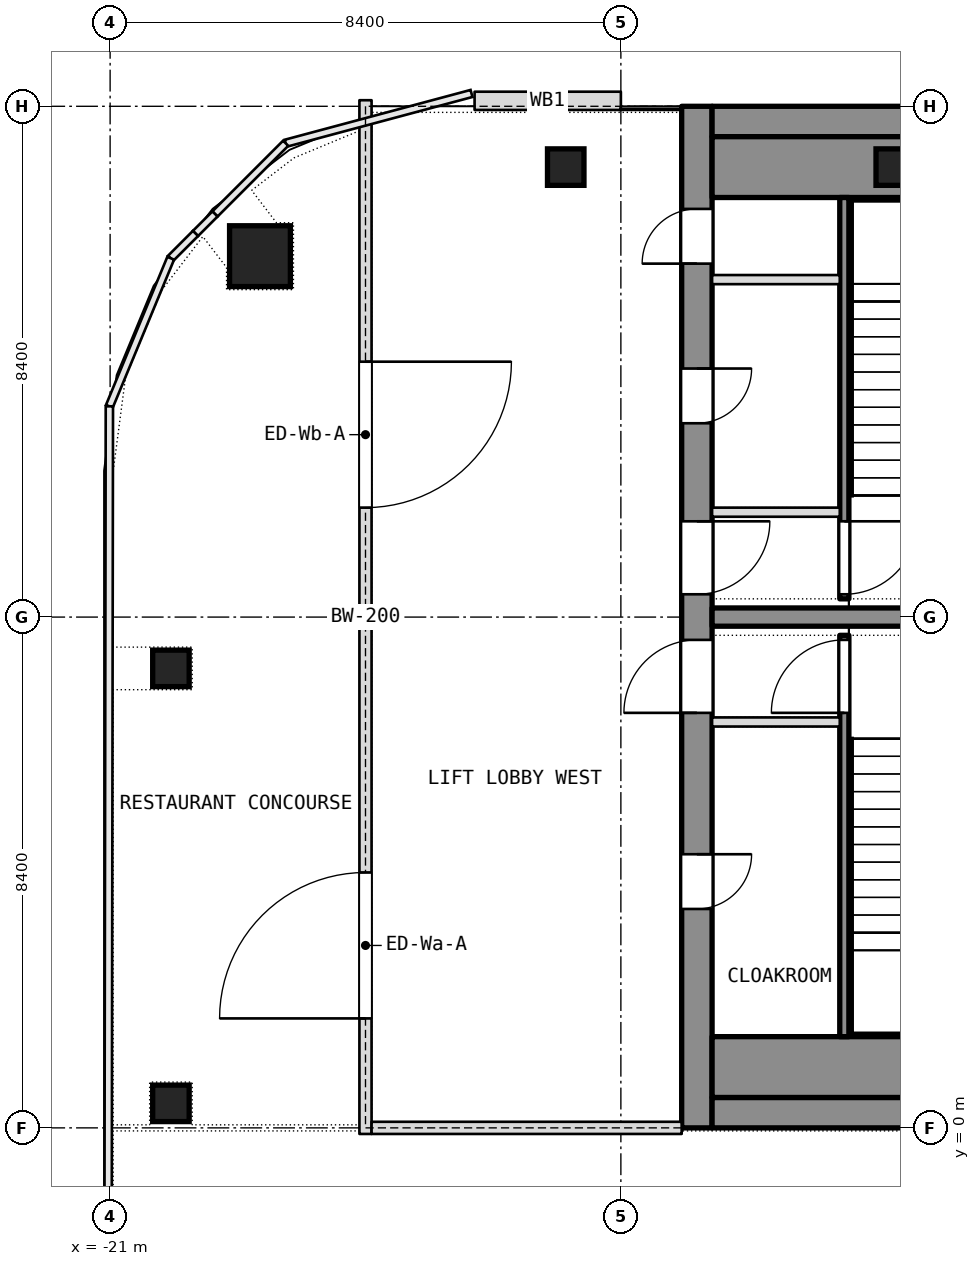
"""IFC4 building model, lengths in metres.
Left out: names, types, materials, properties, quantities, classifications, styles, units other than length and angle.
Written with IfcOpenShell. Run it as: python <this file> out.ifc"""

import sys

from ifc_helpers import new_model, si_unit, direction, frame, frame_2d, origin, origin_2d, place, context, subcontext, project, spatial, rectangle, extrude, element, fill, save


model = new_model("IFC4")
c1 = context("Model", 3, precision=1e-05, world=origin(), true_north=direction((0.0, 1.0)))
c2 = subcontext(c1, "Body", "Model", "MODEL_VIEW")
j1 = project(units=[si_unit("LENGTHUNIT", "METRE"), si_unit("PLANEANGLEUNIT", "RADIAN")], contexts=[c1])
p1 = place(None, origin())
s1 = spatial("IfcSite", under=j1, at=p1, CompositionType="ELEMENT")
p2 = place(p1, origin())
s2 = spatial("IfcBuilding", under=s1, at=p2, CompositionType="ELEMENT")
p3 = place(p2, frame((0.0, 0.0, 288.5)))
s3 = spatial("IfcBuildingStorey", under=s2, at=p3, CompositionType="ELEMENT", Elevation=288.5)
p4 = place(p3, frame((-11.35, 0.0, 0.0), z_axis=(0.0, 0.0, 1.0), x_axis=(0.0, 1.0, 0.0)))
e1 = element("IfcWall", 1, at=p4, inside=s3, PredefinedType="SHEAR", context=c2, shape_type="SweptSolid", body=[
    extrude(rectangle(XDim=16.8, YDim=0.5, at=frame_2d((8.4, 0.0))), origin(), (0.0, 0.0, 1.0), 7.2),
])
p5 = place(p4, frame((3.6, 0.0, 0.0)))
e2 = element("IfcOpeningElement", 2, at=p5, cuts=e1, PredefinedType="OPENING", context=c2, shape_type="SweptSolid", body=[
    extrude(rectangle(XDim=0.9, YDim=2.1, at=frame_2d((0.45, 1.05))), frame((0.0, 0.25, 0.0), z_axis=(0.0, -1.0, 0.0), x_axis=(1.0, 0.0, 0.0)), (0.0, 0.0, 1.0), 0.5),
])
p6 = place(p4, frame((6.825, 0.0, 0.0)))
e3 = element("IfcOpeningElement", 3, at=p6, cuts=e1, PredefinedType="OPENING", context=c2, shape_type="SweptSolid", body=[
    extrude(rectangle(XDim=1.2, YDim=2.1, at=frame_2d((0.6, 1.05))), frame((0.0, 0.25, 0.0), z_axis=(0.0, -1.0, 0.0), x_axis=(1.0, 0.0, 0.0)), (0.0, 0.0, 1.0), 0.5),
])
p7 = place(p4, frame((14.212, 0.0, 0.0)))
e4 = element("IfcOpeningElement", 4, at=p7, cuts=e1, PredefinedType="OPENING", context=c2, shape_type="SweptSolid", body=[
    extrude(rectangle(XDim=0.9, YDim=2.1, at=frame_2d((0.45, 1.05))), frame((0.0, 0.25, 0.0), z_axis=(0.0, -1.0, 0.0), x_axis=(1.0, 0.0, 0.0)), (0.0, 0.0, 1.0), 0.5),
])
p8 = place(p4, frame((11.587, 0.0, 0.0)))
e5 = element("IfcOpeningElement", 5, at=p8, cuts=e1, PredefinedType="OPENING", context=c2, shape_type="SweptSolid", body=[
    extrude(rectangle(XDim=0.9, YDim=2.1, at=frame_2d((0.45, 1.05))), frame((0.0, 0.25, 0.0), z_axis=(0.0, -1.0, 0.0), x_axis=(1.0, 0.0, 0.0)), (0.0, 0.0, 1.0), 0.5),
])
p9 = place(p4, frame((8.775, 0.0, 0.0)))
e6 = element("IfcOpeningElement", 6, at=p9, cuts=e1, PredefinedType="OPENING", context=c2, shape_type="SweptSolid", body=[
    extrude(rectangle(XDim=1.2, YDim=2.1, at=frame_2d((0.6, 1.05))), frame((0.0, 0.25, 0.0), z_axis=(0.0, -1.0, 0.0), x_axis=(1.0, 0.0, 0.0)), (0.0, 0.0, 1.0), 0.5),
])
for number, where, z_axis, x_axis in (
    (7, (-11.1, 0.25, 0.0), (0.0, 0.0, 1.0), (1.0, 0.0, 0.0)),
    (8, (-11.1, 16.55, 0.0), (0.0, 0.0, 1.0), (1.0, 0.0, 0.0)),
):
    element("IfcWall", number, at=place(p3, frame(where, z_axis=z_axis, x_axis=x_axis)), inside=s3, PredefinedType="SHEAR", context=c2, shape_type="SweptSolid", body=[
        extrude(rectangle(XDim=22.2, YDim=0.5, at=frame_2d((11.1, 0.0))), origin(), (0.0, 0.0, 1.0), 7.2),
    ])
p10 = place(p3, frame((-11.1, 8.4, 0.0), z_axis=(0.0, 0.0, 1.0), x_axis=(1.0, 0.0, 0.0)))
e9 = element("IfcWall", 9, at=p10, inside=s3, PredefinedType="SHEAR", context=c2, shape_type="SweptSolid", body=[
    extrude(rectangle(XDim=6.75, YDim=0.3, at=frame_2d((3.375, 0.0))), origin(), (0.0, 0.0, 1.0), 7.2),
])
p11 = place(p3, frame((-18.535, 14.335, 0.0), z_axis=(0.0, 0.0, 1.0), x_axis=(1.0, 0.0, 0.0)))
e10 = element("IfcColumn", 10, at=p11, inside=s3, PredefinedType="COLUMN", context=c2, shape_type="SweptSolid", body=[
    extrude(rectangle(XDim=1.0, YDim=1.0, at=origin_2d()), origin(), (0.0, 0.0, 1.0), 6.9),
])
for number, where, z_axis, x_axis in (
    (11, (-20.0, 0.403, 0.0), (0.0, 0.0, 1.0), (1.0, 0.0, 0.0)),
    (12, (-20.0, 7.556, 0.0), (0.0, 0.0, 1.0), (1.0, 0.0, 0.0)),
    (13, (-13.507, 15.8, 0.0), (0.0, 0.0, 1.0), (1.0, 0.0, 0.0)),
    (14, (-8.104, 15.8, 0.0), (0.0, 0.0, 1.0), (1.0, 0.0, 0.0)),
):
    element("IfcColumn", number, at=place(p3, frame(where, z_axis=z_axis, x_axis=x_axis)), inside=s3, PredefinedType="COLUMN", context=c2, shape_type="SweptSolid", body=[
        extrude(rectangle(XDim=0.6, YDim=0.6, at=origin_2d()), origin(), (0.0, 0.0, 1.0), 6.9),
    ])
p12 = place(p3, frame((-12.6, 16.89, 0.0), z_axis=(0.0, 0.0, 1.0), x_axis=(-1.0, 0.0, 0.0)))
e15 = element("IfcWall", 15, at=p12, inside=s3, PredefinedType="NOTDEFINED", context=c2, shape_type="SweptSolid", body=[
    extrude(rectangle(XDim=2.406, YDim=0.3, at=frame_2d((1.203, 0.0))), origin(), (0.0, 0.0, 1.0), 7.2),
])
for number, where, z_axis, x_axis in (
    (16, (-11.1, 1.0, 0.0), (0.0, 0.0, 1.0), (1.0, 0.0, 0.0)),
    (17, (-11.1, 15.8, 0.0), (0.0, 0.0, 1.0), (1.0, 0.0, 0.0)),
):
    element("IfcWall", number, at=place(p3, frame(where, z_axis=z_axis, x_axis=x_axis)), inside=s3, PredefinedType="PARTITIONING", context=c2, shape_type="SweptSolid", body=[
        extrude(rectangle(XDim=22.2, YDim=1.0, at=frame_2d((11.1, 0.0))), origin(), (0.0, 0.0, 1.0), 6.9),
    ])
p13 = place(p3, frame((-8.925, 1.5, 0.0), z_axis=(0.0, 0.0, 1.0), x_axis=(0.0, 1.0, 0.0)))
e18 = element("IfcWall", 18, at=p13, inside=s3, PredefinedType="SHEAR", context=c2, shape_type="SweptSolid", body=[
    extrude(rectangle(XDim=6.6, YDim=0.15, at=frame_2d((3.3, 0.0))), origin(), (0.0, 0.0, 1.0), 6.9),
])
p14 = place(p13, frame((5.325, 0.0, 0.0)))
e19 = element("IfcOpeningElement", 19, at=p14, cuts=e18, PredefinedType="OPENING", context=c2, shape_type="SweptSolid", body=[
    extrude(rectangle(XDim=1.2, YDim=2.1, at=frame_2d((0.6, 1.05))), frame((0.0, 0.075, 0.0), z_axis=(0.0, -1.0, 0.0), x_axis=(1.0, 0.0, 0.0)), (0.0, 0.0, 1.0), 0.15),
])
p15 = place(p3, frame((-11.1, 6.675, 0.0), z_axis=(0.0, 0.0, 1.0), x_axis=(1.0, 0.0, 0.0)))
e20 = element("IfcWall", 20, at=p15, inside=s3, PredefinedType="PARTITIONING", context=c2, shape_type="SweptSolid", body=[
    extrude(rectangle(XDim=2.1, YDim=0.15, at=frame_2d((1.05, 0.0))), origin(), (0.0, 0.0, 1.0), 6.9),
])
p16 = place(p3, frame((-8.925, 8.7, 0.0), z_axis=(0.0, 0.0, 1.0), x_axis=(0.0, 1.0, 0.0)))
e21 = element("IfcWall", 21, at=p16, inside=s3, PredefinedType="SHEAR", context=c2, shape_type="SweptSolid", body=[
    extrude(rectangle(XDim=6.6, YDim=0.15, at=frame_2d((3.3, 0.0))), origin(), (0.0, 0.0, 1.0), 6.9),
])
p17 = place(p16, frame((0.075, 0.0, 0.0)))
e22 = element("IfcOpeningElement", 22, at=p17, cuts=e21, PredefinedType="OPENING", context=c2, shape_type="SweptSolid", body=[
    extrude(rectangle(XDim=1.2, YDim=2.1, at=frame_2d((0.6, 1.05))), frame((0.0, 0.075, 0.0), z_axis=(0.0, -1.0, 0.0), x_axis=(1.0, 0.0, 0.0)), (0.0, 0.0, 1.0), 0.15),
])
for number, where, z_axis, x_axis in (
    (23, (-11.1, 10.125, 0.0), (0.0, 0.0, 1.0), (1.0, 0.0, 0.0)),
    (24, (-11.1, 13.95, 0.0), (0.0, 0.0, 1.0), (1.0, 0.0, 0.0)),
):
    element("IfcWall", number, at=place(p3, frame(where, z_axis=z_axis, x_axis=x_axis)), inside=s3, PredefinedType="PARTITIONING", context=c2, shape_type="SweptSolid", body=[
        extrude(rectangle(XDim=2.1, YDim=0.15, at=frame_2d((1.05, 0.0))), origin(), (0.0, 0.0, 1.0), 6.9),
    ])
p18 = place(p3, frame((-16.8, -0.1, 0.0), z_axis=(0.0, 0.0, 1.0), x_axis=(0.0, 1.0, 0.0)))
e25 = element("IfcWall", 25, at=p18, inside=s3, PredefinedType="PARTITIONING", context=c2, shape_type="SweptSolid", body=[
    extrude(rectangle(XDim=17.0, YDim=0.2, at=frame_2d((8.5, 0.0))), origin(), (0.0, 0.0, 1.0), 6.9),
])
p19 = place(p18, frame((1.9, 0.0, 0.0)))
e26 = element("IfcOpeningElement", 26, at=p19, cuts=e25, PredefinedType="OPENING", context=c2, shape_type="SweptSolid", body=[
    extrude(rectangle(XDim=2.4, YDim=2.1, at=frame_2d((1.2, 1.05))), frame((0.0, 0.1, 0.0), z_axis=(0.0, -1.0, 0.0), x_axis=(1.0, 0.0, 0.0)), (0.0, 0.0, 1.0), 0.2),
])
p20 = place(p18, frame((10.3, 0.0, 0.0)))
e27 = element("IfcOpeningElement", 27, at=p20, cuts=e25, PredefinedType="OPENING", context=c2, shape_type="SweptSolid", body=[
    extrude(rectangle(XDim=2.4, YDim=2.1, at=frame_2d((1.2, 1.05))), frame((0.0, 0.1, 0.0), z_axis=(0.0, -1.0, 0.0), x_axis=(1.0, 0.0, 0.0)), (0.0, 0.0, 1.0), 0.2),
])
p21 = place(p3, frame((-16.7, 0.0, 0.0), z_axis=(0.0, 0.0, 1.0), x_axis=(1.0, 0.0, 0.0)))
e28 = element("IfcWall", 28, at=p21, inside=s3, PredefinedType="PARTITIONING", context=c2, shape_type="SweptSolid", body=[
    extrude(rectangle(XDim=5.1, YDim=0.2, at=frame_2d((2.55, 0.0))), origin(), (0.0, 0.0, 1.0), 6.56),
])
p22 = place(p5, origin())
e29 = element("IfcDoor", 29, at=p22, inside=s3, OperationType="SINGLE_SWING_LEFT", PredefinedType="DOOR", context=c2, shape_type="SweptSolid", body=[
    extrude(rectangle(XDim=0.9, YDim=2.1, at=frame_2d((0.45, 1.05))), frame((0.0, 0.025, 0.0), z_axis=(0.0, -1.0, 0.0), x_axis=(1.0, 0.0, 0.0)), (0.0, 0.0, 1.0), 0.05),
])
fill(e2, e29)
p23 = place(p6, origin())
e30 = element("IfcDoor", 30, at=p23, inside=s3, OperationType="SINGLE_SWING_LEFT", PredefinedType="DOOR", context=c2, shape_type="SweptSolid", body=[
    extrude(rectangle(XDim=1.2, YDim=2.1, at=frame_2d((0.6, 1.05))), frame((0.0, 0.025, 0.0), z_axis=(0.0, -1.0, 0.0), x_axis=(1.0, 0.0, 0.0)), (0.0, 0.0, 1.0), 0.05),
])
fill(e3, e30)
p24 = place(p14, origin())
e31 = element("IfcDoor", 31, at=p24, inside=s3, OperationType="SINGLE_SWING_LEFT", PredefinedType="DOOR", context=c2, shape_type="SweptSolid", body=[
    extrude(rectangle(XDim=1.2, YDim=2.1, at=frame_2d((0.6, 1.05))), frame((0.0, 0.025, 0.0), z_axis=(0.0, -1.0, 0.0), x_axis=(1.0, 0.0, 0.0)), (0.0, 0.0, 1.0), 0.05),
])
fill(e19, e31)
p25 = place(p7, origin())
e32 = element("IfcDoor", 32, at=p25, inside=s3, OperationType="SINGLE_SWING_LEFT", PredefinedType="DOOR", context=c2, shape_type="SweptSolid", body=[
    extrude(rectangle(XDim=0.9, YDim=2.1, at=frame_2d((0.45, 1.05))), frame((0.0, 0.025, 0.0), z_axis=(0.0, -1.0, 0.0), x_axis=(1.0, 0.0, 0.0)), (0.0, 0.0, 1.0), 0.05),
])
fill(e4, e32)
p26 = place(p8, origin())
e33 = element("IfcDoor", 33, at=p26, inside=s3, OperationType="SINGLE_SWING_LEFT", PredefinedType="DOOR", context=c2, shape_type="SweptSolid", body=[
    extrude(rectangle(XDim=0.9, YDim=2.1, at=frame_2d((0.45, 1.05))), frame((0.0, 0.025, 0.0), z_axis=(0.0, -1.0, 0.0), x_axis=(1.0, 0.0, 0.0)), (0.0, 0.0, 1.0), 0.05),
])
fill(e5, e33)
p27 = place(p9, origin())
e34 = element("IfcDoor", 34, at=p27, inside=s3, OperationType="SINGLE_SWING_LEFT", PredefinedType="DOOR", context=c2, shape_type="SweptSolid", body=[
    extrude(rectangle(XDim=1.2, YDim=2.1, at=frame_2d((0.6, 1.05))), frame((0.0, 0.025, 0.0), z_axis=(0.0, -1.0, 0.0), x_axis=(1.0, 0.0, 0.0)), (0.0, 0.0, 1.0), 0.05),
])
fill(e6, e34)
p28 = place(p17, origin())
e35 = element("IfcDoor", 35, at=p28, inside=s3, OperationType="SINGLE_SWING_LEFT", PredefinedType="DOOR", context=c2, shape_type="SweptSolid", body=[
    extrude(rectangle(XDim=1.2, YDim=2.1, at=frame_2d((0.6, 1.05))), frame((0.0, 0.025, 0.0), z_axis=(0.0, -1.0, 0.0), x_axis=(1.0, 0.0, 0.0)), (0.0, 0.0, 1.0), 0.05),
])
fill(e22, e35)
p29 = place(p19, origin())
e36 = element("IfcDoor", 36, at=p29, inside=s3, OperationType="DOUBLE_DOOR_SINGLE_SWING", PredefinedType="DOOR", context=c2, shape_type="SweptSolid", body=[
    extrude(rectangle(XDim=2.4, YDim=2.1, at=frame_2d((1.2, 1.05))), frame((0.0, 0.025, 0.0), z_axis=(0.0, -1.0, 0.0), x_axis=(1.0, 0.0, 0.0)), (0.0, 0.0, 1.0), 0.05),
])
fill(e26, e36)
p30 = place(p20, origin())
e37 = element("IfcDoor", 37, at=p30, inside=s3, OperationType="DOUBLE_DOOR_SINGLE_SWING", PredefinedType="DOOR", context=c2, shape_type="SweptSolid", body=[
    extrude(rectangle(XDim=2.4, YDim=2.1, at=frame_2d((1.2, 1.05))), frame((0.0, 0.025, 0.0), z_axis=(0.0, -1.0, 0.0), x_axis=(1.0, 0.0, 0.0)), (0.0, 0.0, 1.0), 0.05),
])
fill(e27, e37)
save(model, sys.argv[1])
